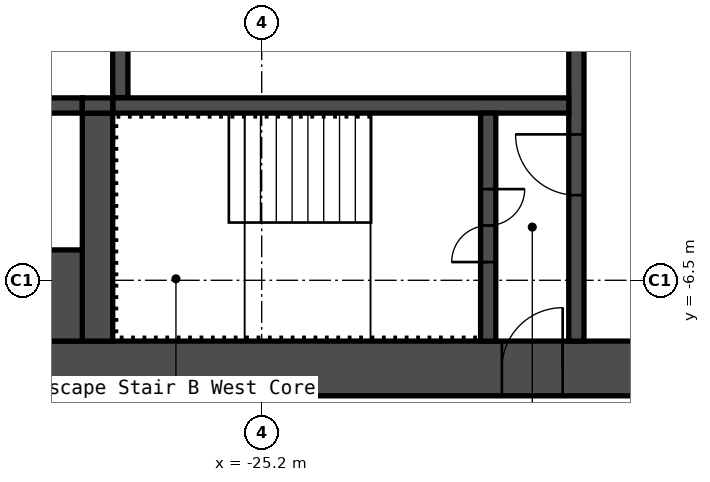
"""IFC4 building model, lengths in metres.
Left out: names, types, materials, properties, quantities, classifications, styles, units other than length and angle.
Written with IfcOpenShell. Run it as: python <this file> out.ifc"""

import sys

from ifc_helpers import new_model, si_unit, direction, frame, frame_2d, origin, place, context, subcontext, project, spatial, rectangle, extrude, element, fill, save


model = new_model("IFC4")
c1 = context("Model", 3, precision=1e-05, world=origin(), true_north=direction((0.0, 1.0)))
c2 = subcontext(c1, "Body", "Model", "MODEL_VIEW")
j1 = project(units=[si_unit("LENGTHUNIT", "METRE"), si_unit("PLANEANGLEUNIT", "RADIAN")], contexts=[c1])
p1 = place(None, origin())
s1 = spatial("IfcSite", under=j1, at=p1, CompositionType="ELEMENT")
p2 = place(p1, origin())
s2 = spatial("IfcBuilding", under=s1, at=p2, CompositionType="ELEMENT")
p3 = place(p2, frame((0.0, 0.0, 163.0)))
s3 = spatial("IfcBuildingStorey", under=s2, at=p3, CompositionType="ELEMENT", Elevation=163.0)
p4 = place(p3, frame((-32.7, -7.95, 0.0), z_axis=(0.0, 0.0, 1.0), x_axis=(1.0, 0.0, 0.0)))
e1 = element("IfcWall", 1, at=p4, inside=s3, PredefinedType="SHEAR", context=c2, shape_type="SweptSolid", body=[
    extrude(rectangle(XDim=15.0, YDim=0.9, at=frame_2d((7.5, 0.0))), origin(), (0.0, 0.0, 1.0), 2.75),
])
p5 = place(p4, frame((11.45, 0.0, 0.0)))
e2 = element("IfcOpeningElement", 2, at=p5, cuts=e1, PredefinedType="OPENING", context=c2, shape_type="SweptSolid", body=[
    extrude(rectangle(XDim=1.0, YDim=2.1, at=frame_2d((0.5, 1.05))), frame((0.0, 0.46, 0.0), z_axis=(0.0, -1.0, 0.0), x_axis=(1.0, 0.0, 0.0)), (0.0, 0.0, 1.0), 0.92),
])
p6 = place(p3, frame((-20.025, -7.5, 0.0), z_axis=(0.0, 0.0, 1.0), x_axis=(0.0, 1.0, 0.0)))
e3 = element("IfcWall", 3, at=p6, inside=s3, PredefinedType="SHEAR", context=c2, shape_type="SweptSolid", body=[
    extrude(rectangle(XDim=6.3, YDim=0.25, at=frame_2d((3.15, 0.0))), origin(), (0.0, 0.0, 1.0), 2.75),
])
p7 = place(p6, frame((2.4, 0.0, 0.0)))
e4 = element("IfcOpeningElement", 4, at=p7, cuts=e3, PredefinedType="OPENING", context=c2, shape_type="SweptSolid", body=[
    extrude(rectangle(XDim=1.0, YDim=2.1, at=frame_2d((0.5, 1.05))), frame((0.0, 0.135, 0.0), z_axis=(0.0, -1.0, 0.0), x_axis=(1.0, 0.0, 0.0)), (0.0, 0.0, 1.0), 0.27),
])
p8 = place(p3, frame((-27.525, -3.5, 0.0), z_axis=(0.0, 0.0, 1.0), x_axis=(0.0, 1.0, 0.0)))
e5 = element("IfcWall", 5, at=p8, inside=s3, PredefinedType="SHEAR", context=c2, shape_type="SweptSolid", body=[
    extrude(rectangle(XDim=2.05, YDim=0.25, at=frame_2d((1.025, 0.0))), origin(), (0.0, 0.0, 1.0), 2.75),
])
p9 = place(p3, frame((-27.65, -3.625, 0.0), z_axis=(0.0, 0.0, 1.0), x_axis=(1.0, 0.0, 0.0)))
e6 = element("IfcWall", 6, at=p9, inside=s3, PredefinedType="SHEAR", context=c2, shape_type="SweptSolid", body=[
    extrude(rectangle(XDim=7.5, YDim=0.25, at=frame_2d((3.75, 0.0))), origin(), (0.0, 0.0, 1.0), 2.75),
])
p10 = place(p3, frame((-21.475, -7.5, 0.0), z_axis=(0.0, 0.0, 1.0), x_axis=(0.0, 1.0, 0.0)))
e7 = element("IfcWall", 7, at=p10, inside=s3, PredefinedType="SHEAR", context=c2, shape_type="SweptSolid", body=[
    extrude(rectangle(XDim=3.75, YDim=0.25, at=frame_2d((1.875, 0.0))), origin(), (0.0, 0.0, 1.0), 2.75),
])
p11 = place(p10, frame((1.3, 0.0, 0.0)))
e8 = element("IfcOpeningElement", 8, at=p11, cuts=e7, PredefinedType="OPENING", context=c2, shape_type="SweptSolid", body=[
    extrude(rectangle(XDim=1.2, YDim=2.1, at=frame_2d((0.6, 1.05))), frame((0.0, 0.135, 0.0), z_axis=(0.0, -1.0, 0.0), x_axis=(1.0, 0.0, 0.0)), (0.0, 0.0, 1.0), 0.27),
])
p12 = place(p3, frame((-27.9, -7.5, 0.0), z_axis=(0.0, 0.0, 1.0), x_axis=(0.0, 1.0, 0.0)))
e9 = element("IfcWall", 9, at=p12, inside=s3, PredefinedType="SHEAR", context=c2, shape_type="SweptSolid", body=[
    extrude(rectangle(XDim=3.75, YDim=0.5, at=frame_2d((1.875, 0.0))), origin(), (0.0, 0.0, 1.0), 2.75),
])
p13 = place(p3, frame((-32.7, -3.625, 0.0), z_axis=(0.0, 0.0, 1.0), x_axis=(1.0, 0.0, 0.0)))
e10 = element("IfcWall", 10, at=p13, inside=s3, PredefinedType="SHEAR", context=c2, shape_type="SweptSolid", body=[
    extrude(rectangle(XDim=4.55, YDim=0.25, at=frame_2d((2.275, 0.0))), origin(), (0.0, 0.0, 1.0), 2.75),
])
p14 = place(p13, frame((2.85, 0.0, 0.0)))
e11 = element("IfcOpeningElement", 11, at=p14, cuts=e10, PredefinedType="OPENING", context=c2, shape_type="SweptSolid", body=[
    extrude(rectangle(XDim=1.1, YDim=2.1, at=frame_2d((0.55, 1.05))), frame((0.0, 0.135, 0.0), z_axis=(0.0, -1.0, 0.0), x_axis=(1.0, 0.0, 0.0)), (0.0, 0.0, 1.0), 0.27),
])
p15 = place(p13, frame((0.6, 0.0, 0.0)))
e12 = element("IfcOpeningElement", 12, at=p15, cuts=e10, PredefinedType="OPENING", context=c2, shape_type="SweptSolid", body=[
    extrude(rectangle(XDim=1.1, YDim=2.1, at=frame_2d((0.55, 1.05))), frame((0.0, 0.135, 0.0), z_axis=(0.0, -1.0, 0.0), x_axis=(1.0, 0.0, 0.0)), (0.0, 0.0, 1.0), 0.27),
])
p16 = place(p3, frame((-32.7, -6.75, 0.0), z_axis=(0.0, 0.0, 1.0), x_axis=(1.0, 0.0, 0.0)))
e13 = element("IfcWall", 13, at=p16, inside=s3, PredefinedType="SHEAR", context=c2, shape_type="SweptSolid", body=[
    extrude(rectangle(XDim=4.55, YDim=1.5, at=frame_2d((2.275, 0.0))), origin(), (0.0, 0.0, 1.0), 2.75),
])
p17 = place(p3, frame((-28.15, -3.625, 0.0), z_axis=(0.0, 0.0, 1.0), x_axis=(1.0, 0.0, 0.0)))
e14 = element("IfcWall", 14, at=p17, inside=s3, PredefinedType="SHEAR", context=c2, shape_type="SweptSolid", body=[
    extrude(rectangle(XDim=0.5, YDim=0.25, at=frame_2d((0.25, 0.0))), origin(), (0.0, 0.0, 1.0), 2.75),
])
p18 = place(p5, origin())
e15 = element("IfcDoor", 15, at=p18, inside=s3, OperationType="SINGLE_SWING_LEFT", PredefinedType="DOOR", context=c2, shape_type="SweptSolid", body=[
    extrude(rectangle(XDim=1.0, YDim=2.1, at=frame_2d((0.5, 1.05))), frame((0.0, 0.025, 0.0), z_axis=(0.0, -1.0, 0.0), x_axis=(1.0, 0.0, 0.0)), (0.0, 0.0, 1.0), 0.05),
])
fill(e2, e15)
p19 = place(p11, origin())
e16 = element("IfcDoor", 16, at=p19, inside=s3, OperationType="DOUBLE_DOOR_SINGLE_SWING", PredefinedType="DOOR", context=c2, shape_type="SweptSolid", body=[
    extrude(rectangle(XDim=1.2, YDim=2.1, at=frame_2d((0.6, 1.05))), frame((0.0, 0.025, 0.0), z_axis=(0.0, -1.0, 0.0), x_axis=(1.0, 0.0, 0.0)), (0.0, 0.0, 1.0), 0.05),
])
fill(e8, e16)
p20 = place(p7, origin())
e17 = element("IfcDoor", 17, at=p20, inside=s3, OperationType="SINGLE_SWING_LEFT", PredefinedType="DOOR", context=c2, shape_type="SweptSolid", body=[
    extrude(rectangle(XDim=1.0, YDim=2.1, at=frame_2d((0.5, 1.05))), frame((0.0, 0.025, 0.0), z_axis=(0.0, -1.0, 0.0), x_axis=(1.0, 0.0, 0.0)), (0.0, 0.0, 1.0), 0.05),
])
fill(e4, e17)
save(model, sys.argv[1])
